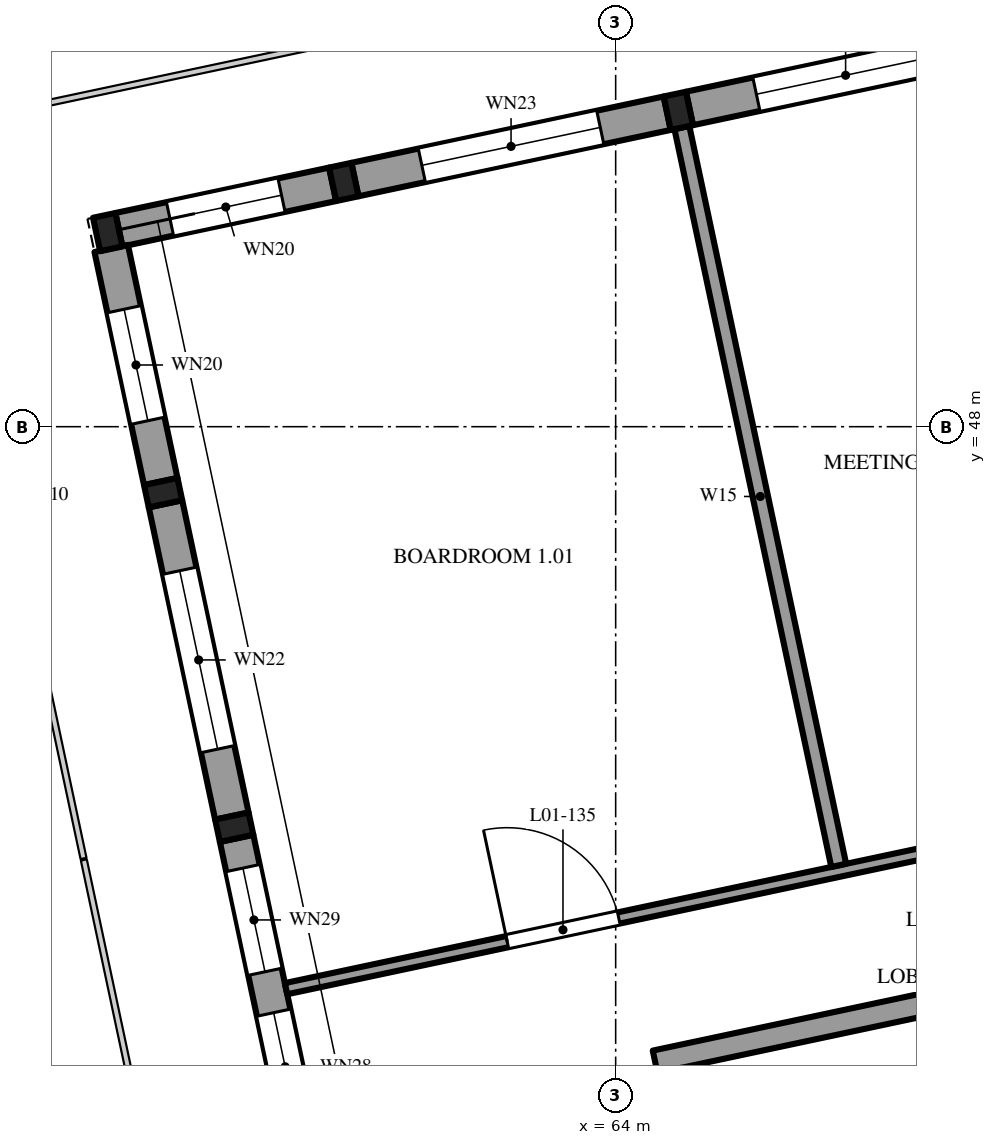
"""IFC4 building model, lengths in metres.
Left out: names, types, materials, properties, quantities, classifications, styles, units other than length and angle.
Written with IfcOpenShell. Run it as: python <this file> out.ifc"""

import sys

from ifc_helpers import new_model, si_unit, direction, frame, frame_2d, origin, origin_2d, place, context, subcontext, project, spatial, rectangle, i_section, extrude, element, fill, save


model = new_model("IFC4")
c1 = context("Model", 3, precision=1e-05, world=origin(), true_north=direction((0.0, 1.0)))
c2 = subcontext(c1, "Body", "Model", "MODEL_VIEW")
j1 = project(units=[si_unit("LENGTHUNIT", "METRE"), si_unit("PLANEANGLEUNIT", "RADIAN")], contexts=[c1])
p1 = place(None, origin())
s1 = spatial("IfcSite", under=j1, at=p1, CompositionType="ELEMENT")
p2 = place(p1, origin())
s2 = spatial("IfcBuilding", under=s1, at=p2, CompositionType="ELEMENT")
p3 = place(p2, frame((0.0, 0.0, 7.2)))
s3 = spatial("IfcBuildingStorey", under=s2, at=p3, CompositionType="ELEMENT", Elevation=7.2)
for number, where, z_axis, x_axis in (
    (1, (57.317, 50.56, 0.0), (0.0, 0.0, 1.0), (0.978, 0.208, 0.0)),
    (2, (60.423, 51.22, 0.0), (0.0, 0.0, 1.0), (0.978, 0.208, 0.0)),
    (3, (64.824, 52.156, 0.0), (0.0, 0.0, 1.0), (0.978, 0.208, 0.0)),
    (4, (58.981, 42.73, 0.0), (0.0, 0.0, 1.0), (-0.208, 0.978, 0.0)),
    (5, (58.046, 47.132, 0.0), (0.0, 0.0, 1.0), (-0.208, 0.978, 0.0)),
):
    element("IfcColumn", number, at=place(p3, frame(where, z_axis=z_axis, x_axis=x_axis)), inside=s3, PredefinedType="COLUMN", context=c2, shape_type="SweptSolid", body=[
        extrude(i_section(OverallWidth=0.3, OverallDepth=0.45, WebThickness=0.014, FlangeThickness=0.026, FilletRadius=0.027, at=origin_2d()), origin(), (0.0, 0.0, 1.0), 4.8),
    ])
p4 = place(p3, frame((64.519, 39.644, 0.0), z_axis=(0.0, 0.0, 1.0), x_axis=(0.978147662755, 0.20791139903, 0.0)))
e6 = element("IfcWall", 6, at=p4, inside=s3, PredefinedType="SHEAR", context=c2, shape_type="SweptSolid", body=[
    extrude(rectangle(XDim=13.7, YDim=0.3, at=frame_2d((6.85, 0.0))), origin(), (0.0, 0.0, 1.0), 4.8),
])
p5 = place(p4, frame((5.1, 0.0, 0.0)))
e7 = element("IfcOpeningElement", 7, at=p5, cuts=e6, PredefinedType="OPENING", context=c2, shape_type="SweptSolid", body=[
    extrude(rectangle(XDim=1.1, YDim=2.1, at=frame_2d((0.55, 1.05))), frame((0.0, 0.16, 0.0), z_axis=(0.0, -1.0, 0.0), x_axis=(1.0, 0.0, 0.0)), (0.0, 0.0, 1.0), 0.32),
])
p6 = place(p4, frame((7.5, 0.0, 0.0)))
e8 = element("IfcOpeningElement", 8, at=p6, cuts=e6, PredefinedType="OPENING", context=c2, shape_type="SweptSolid", body=[
    extrude(rectangle(XDim=1.1, YDim=2.1, at=frame_2d((0.55, 1.05))), frame((0.0, 0.16, 0.0), z_axis=(0.0, -1.0, 0.0), x_axis=(1.0, 0.0, 0.0)), (0.0, 0.0, 1.0), 0.32),
])
p7 = place(p3, frame((57.464, 50.592, 0.0), z_axis=(0.0, 0.0, 1.0), x_axis=(0.978155181918, 0.207876020951, 0.0)))
e9 = element("IfcWall", 9, at=p7, inside=s3, PredefinedType="SOLIDWALL", context=c2, shape_type="SweptSolid", body=[
    extrude(rectangle(XDim=2.875, YDim=0.45, at=frame_2d((1.438, 0.0))), origin(), (0.0, 0.0, 1.0), 4.35),
])
p8 = place(p7, frame((0.688, 0.0, 0.9)))
e10 = element("IfcOpeningElement", 10, at=p8, cuts=e9, PredefinedType="OPENING", context=c2, shape_type="SweptSolid", body=[
    extrude(rectangle(XDim=1.5, YDim=2.4, at=frame_2d((0.75, 1.2))), frame((0.0, 0.235, 0.0), z_axis=(0.0, -1.0, 0.0), x_axis=(1.0, 0.0, 0.0)), (0.0, 0.0, 1.0), 0.47),
])
p9 = place(p3, frame((60.57, 51.251, 0.0), z_axis=(0.0, 0.0, 1.0), x_axis=(0.978143927149, 0.207928972925, 0.0)))
e11 = element("IfcWall", 11, at=p9, inside=s3, PredefinedType="SOLIDWALL", context=c2, shape_type="SweptSolid", body=[
    extrude(rectangle(XDim=4.2, YDim=0.45, at=frame_2d((2.1, 0.0))), origin(), (0.0, 0.0, 1.0), 4.35),
])
p10 = place(p9, frame((0.9, 0.0, 0.6)))
e12 = element("IfcOpeningElement", 12, at=p10, cuts=e11, PredefinedType="OPENING", context=c2, shape_type="SweptSolid", body=[
    extrude(rectangle(XDim=2.4, YDim=2.7, at=frame_2d((1.2, 1.35))), frame((0.0, 0.235, 0.0), z_axis=(0.0, -1.0, 0.0), x_axis=(1.0, 0.0, 0.0)), (0.0, 0.0, 1.0), 0.47),
])
p11 = place(p3, frame((64.971, 52.187, 0.0), z_axis=(0.0, 0.0, 1.0), x_axis=(0.978155748334, 0.207873355681, 0.0)))
e13 = element("IfcWall", 13, at=p11, inside=s3, PredefinedType="SOLIDWALL", context=c2, shape_type="SweptSolid", body=[
    extrude(rectangle(XDim=4.2, YDim=0.45, at=frame_2d((2.1, 0.0))), origin(), (0.0, 0.0, 1.0), 4.35),
])
p12 = place(p11, frame((0.9, 0.0, 0.9)))
e14 = element("IfcOpeningElement", 14, at=p12, cuts=e13, PredefinedType="OPENING", context=c2, shape_type="SweptSolid", body=[
    extrude(rectangle(XDim=2.4, YDim=2.4, at=frame_2d((1.2, 1.2))), frame((0.0, 0.235, 0.0), z_axis=(0.0, -1.0, 0.0), x_axis=(1.0, 0.0, 0.0)), (0.0, 0.0, 1.0), 0.47),
])
p13 = place(p3, frame((59.886, 38.475, 0.0), z_axis=(0.0, 0.0, 1.0), x_axis=(-0.207928972925, 0.978143927149, 0.0)))
e15 = element("IfcWall", 15, at=p13, inside=s3, PredefinedType="SOLIDWALL", context=c2, shape_type="SweptSolid", body=[
    extrude(rectangle(XDim=4.2, YDim=0.45, at=frame_2d((2.1, 0.0))), origin(), (0.0, 0.0, 1.0), 4.35),
])
p14 = place(p13, frame((0.4, 0.0, 0.9)))
e16 = element("IfcOpeningElement", 16, at=p14, cuts=e15, PredefinedType="OPENING", context=c2, shape_type="SweptSolid", body=[
    extrude(rectangle(XDim=1.455, YDim=2.4, at=frame_2d((0.728, 1.2))), frame((0.0, 0.235, 0.0), z_axis=(0.0, -1.0, 0.0), x_axis=(1.0, 0.0, 0.0)), (0.0, 0.0, 1.0), 0.47),
])
p15 = place(p13, frame((2.405, 0.0, 0.9)))
e17 = element("IfcOpeningElement", 17, at=p15, cuts=e15, PredefinedType="OPENING", context=c2, shape_type="SweptSolid", body=[
    extrude(rectangle(XDim=1.395, YDim=2.4, at=frame_2d((0.698, 1.2))), frame((0.0, 0.235, 0.0), z_axis=(0.0, -1.0, 0.0), x_axis=(1.0, 0.0, 0.0)), (0.0, 0.0, 1.0), 0.47),
])
p16 = place(p3, frame((58.95, 42.877, 0.0), z_axis=(0.0, 0.0, 1.0), x_axis=(-0.207873355681, 0.978155748334, 0.0)))
e18 = element("IfcWall", 18, at=p16, inside=s3, PredefinedType="SOLIDWALL", context=c2, shape_type="SweptSolid", body=[
    extrude(rectangle(XDim=4.2, YDim=0.45, at=frame_2d((2.1, 0.0))), origin(), (0.0, 0.0, 1.0), 4.35),
])
p17 = place(p16, frame((0.9, 0.0, 0.9)))
e19 = element("IfcOpeningElement", 19, at=p17, cuts=e18, PredefinedType="OPENING", context=c2, shape_type="SweptSolid", body=[
    extrude(rectangle(XDim=2.4, YDim=2.4, at=frame_2d((1.2, 1.2))), frame((0.0, 0.235, 0.0), z_axis=(0.0, -1.0, 0.0), x_axis=(1.0, 0.0, 0.0)), (0.0, 0.0, 1.0), 0.47),
])
p18 = place(p3, frame((58.015, 47.279, 0.0), z_axis=(0.0, 0.0, 1.0), x_axis=(-0.207933268122, 0.978143014087, 0.0)))
e20 = element("IfcWall", 20, at=p18, inside=s3, PredefinedType="SOLIDWALL", context=c2, shape_type="SweptSolid", body=[
    extrude(rectangle(XDim=3.135, YDim=0.45, at=frame_2d((1.567, 0.0))), origin(), (0.0, 0.0, 1.0), 4.35),
])
p19 = place(p18, frame((0.817, 0.0, 0.9)))
e21 = element("IfcOpeningElement", 21, at=p19, cuts=e20, PredefinedType="OPENING", context=c2, shape_type="SweptSolid", body=[
    extrude(rectangle(XDim=1.5, YDim=2.4, at=frame_2d((0.75, 1.2))), frame((0.0, 0.235, 0.0), z_axis=(0.0, -1.0, 0.0), x_axis=(1.0, 0.0, 0.0)), (0.0, 0.0, 1.0), 0.47),
])
p20 = place(p3, frame((59.663, 40.605, 0.0), z_axis=(0.0, 0.0, 1.0), x_axis=(0.978147466509, 0.207912322295, 0.0)))
e22 = element("IfcWall", 22, at=p20, inside=s3, PredefinedType="PARTITIONING", context=c2, shape_type="SweptSolid", body=[
    extrude(rectangle(XDim=34.45, YDim=0.15, at=frame_2d((17.225, 0.0))), origin(), (0.0, 0.0, 1.0), 3.75),
])
p21 = place(p20, frame((2.975, 0.0, 0.0)))
e23 = element("IfcOpeningElement", 23, at=p21, cuts=e22, PredefinedType="OPENING", context=c2, shape_type="SweptSolid", body=[
    extrude(rectangle(XDim=1.5, YDim=2.1, at=frame_2d((0.75, 1.05))), frame((0.0, 0.085, 0.0), z_axis=(0.0, -1.0, 0.0), x_axis=(1.0, 0.0, 0.0)), (0.0, 0.0, 1.0), 0.17),
])
p22 = place(p20, frame((9.2, 0.0, 0.0)))
e24 = element("IfcOpeningElement", 24, at=p22, cuts=e22, PredefinedType="OPENING", context=c2, shape_type="SweptSolid", body=[
    extrude(rectangle(XDim=1.0, YDim=2.1, at=frame_2d((0.5, 1.05))), frame((0.0, 0.085, 0.0), z_axis=(0.0, -1.0, 0.0), x_axis=(1.0, 0.0, 0.0)), (0.0, 0.0, 1.0), 0.17),
])
p23 = place(p20, frame((13.7, 0.0, 0.0)))
e25 = element("IfcOpeningElement", 25, at=p23, cuts=e22, PredefinedType="OPENING", context=c2, shape_type="SweptSolid", body=[
    extrude(rectangle(XDim=1.0, YDim=2.1, at=frame_2d((0.5, 1.05))), frame((0.0, 0.085, 0.0), z_axis=(0.0, -1.0, 0.0), x_axis=(1.0, 0.0, 0.0)), (0.0, 0.0, 1.0), 0.17),
])
p24 = place(p20, frame((18.2, 0.0, 0.0)))
e26 = element("IfcOpeningElement", 26, at=p24, cuts=e22, PredefinedType="OPENING", context=c2, shape_type="SweptSolid", body=[
    extrude(rectangle(XDim=1.0, YDim=2.1, at=frame_2d((0.5, 1.05))), frame((0.0, 0.085, 0.0), z_axis=(0.0, -1.0, 0.0), x_axis=(1.0, 0.0, 0.0)), (0.0, 0.0, 1.0), 0.17),
])
p25 = place(p20, frame((24.55, 0.0, 0.0)))
e27 = element("IfcOpeningElement", 27, at=p25, cuts=e22, PredefinedType="OPENING", context=c2, shape_type="SweptSolid", body=[
    extrude(rectangle(XDim=1.8, YDim=2.1, at=frame_2d((0.9, 1.05))), frame((0.0, 0.085, 0.0), z_axis=(0.0, -1.0, 0.0), x_axis=(1.0, 0.0, 0.0)), (0.0, 0.0, 1.0), 0.17),
])
p26 = place(p20, frame((31.7, 0.0, 0.0)))
e28 = element("IfcOpeningElement", 28, at=p26, cuts=e22, PredefinedType="OPENING", context=c2, shape_type="SweptSolid", body=[
    extrude(rectangle(XDim=1.0, YDim=2.1, at=frame_2d((0.5, 1.05))), frame((0.0, 0.085, 0.0), z_axis=(0.0, -1.0, 0.0), x_axis=(1.0, 0.0, 0.0)), (0.0, 0.0, 1.0), 0.17),
])
p27 = place(p3, frame((64.871, 51.936, 0.0), z_axis=(0.0, 0.0, 1.0), x_axis=(0.20790935802, -0.978148096582, 0.0)))
e29 = element("IfcWall", 29, at=p27, inside=s3, PredefinedType="PARTITIONING", context=c2, shape_type="SweptSolid", body=[
    extrude(rectangle(XDim=9.925, YDim=0.2, at=frame_2d((4.962, 0.0))), origin(), (0.0, 0.0, 1.0), 3.75),
])
p28 = place(p8, origin())
e30 = element("IfcWindow", 30, at=p28, inside=s3, PartitioningType="SINGLE_PANEL", PredefinedType="WINDOW", context=c2, shape_type="SweptSolid", body=[
    extrude(rectangle(XDim=1.5, YDim=2.4, at=frame_2d((0.75, 1.2))), frame((0.0, 0.03, 0.0), z_axis=(0.0, -1.0, 0.0), x_axis=(1.0, 0.0, 0.0)), (0.0, 0.0, 1.0), 0.06),
])
fill(e10, e30)
p29 = place(p10, origin())
e31 = element("IfcWindow", 31, at=p29, inside=s3, PartitioningType="SINGLE_PANEL", PredefinedType="WINDOW", context=c2, shape_type="SweptSolid", body=[
    extrude(rectangle(XDim=2.4, YDim=2.7, at=frame_2d((1.2, 1.35))), frame((0.0, 0.03, 0.0), z_axis=(0.0, -1.0, 0.0), x_axis=(1.0, 0.0, 0.0)), (0.0, 0.0, 1.0), 0.06),
])
fill(e12, e31)
p30 = place(p12, origin())
e32 = element("IfcWindow", 32, at=p30, inside=s3, PartitioningType="SINGLE_PANEL", PredefinedType="WINDOW", context=c2, shape_type="SweptSolid", body=[
    extrude(rectangle(XDim=2.4, YDim=2.4, at=frame_2d((1.2, 1.2))), frame((0.0, 0.03, 0.0), z_axis=(0.0, -1.0, 0.0), x_axis=(1.0, 0.0, 0.0)), (0.0, 0.0, 1.0), 0.06),
])
fill(e14, e32)
p31 = place(p14, origin())
e33 = element("IfcWindow", 33, at=p31, inside=s3, PartitioningType="SINGLE_PANEL", PredefinedType="WINDOW", context=c2, shape_type="SweptSolid", body=[
    extrude(rectangle(XDim=1.455, YDim=2.4, at=frame_2d((0.728, 1.2))), frame((0.0, 0.03, 0.0), z_axis=(0.0, -1.0, 0.0), x_axis=(1.0, 0.0, 0.0)), (0.0, 0.0, 1.0), 0.06),
])
fill(e16, e33)
p32 = place(p15, origin())
e34 = element("IfcWindow", 34, at=p32, inside=s3, PartitioningType="SINGLE_PANEL", PredefinedType="WINDOW", context=c2, shape_type="SweptSolid", body=[
    extrude(rectangle(XDim=1.395, YDim=2.4, at=frame_2d((0.698, 1.2))), frame((0.0, 0.03, 0.0), z_axis=(0.0, -1.0, 0.0), x_axis=(1.0, 0.0, 0.0)), (0.0, 0.0, 1.0), 0.06),
])
fill(e17, e34)
p33 = place(p17, origin())
e35 = element("IfcWindow", 35, at=p33, inside=s3, PartitioningType="SINGLE_PANEL", PredefinedType="WINDOW", context=c2, shape_type="SweptSolid", body=[
    extrude(rectangle(XDim=2.4, YDim=2.4, at=frame_2d((1.2, 1.2))), frame((0.0, 0.03, 0.0), z_axis=(0.0, -1.0, 0.0), x_axis=(1.0, 0.0, 0.0)), (0.0, 0.0, 1.0), 0.06),
])
fill(e19, e35)
p34 = place(p19, origin())
e36 = element("IfcWindow", 36, at=p34, inside=s3, PartitioningType="SINGLE_PANEL", PredefinedType="WINDOW", context=c2, shape_type="SweptSolid", body=[
    extrude(rectangle(XDim=1.5, YDim=2.4, at=frame_2d((0.75, 1.2))), frame((0.0, 0.03, 0.0), z_axis=(0.0, -1.0, 0.0), x_axis=(1.0, 0.0, 0.0)), (0.0, 0.0, 1.0), 0.06),
])
fill(e21, e36)
p35 = place(p21, origin())
e37 = element("IfcDoor", 37, at=p35, inside=s3, OperationType="DOUBLE_DOOR_SINGLE_SWING", PredefinedType="DOOR", context=c2, shape_type="SweptSolid", body=[
    extrude(rectangle(XDim=1.5, YDim=2.1, at=frame_2d((0.75, 1.05))), frame((0.0, 0.025, 0.0), z_axis=(0.0, -1.0, 0.0), x_axis=(1.0, 0.0, 0.0)), (0.0, 0.0, 1.0), 0.05),
])
fill(e23, e37)
save(model, sys.argv[1])
